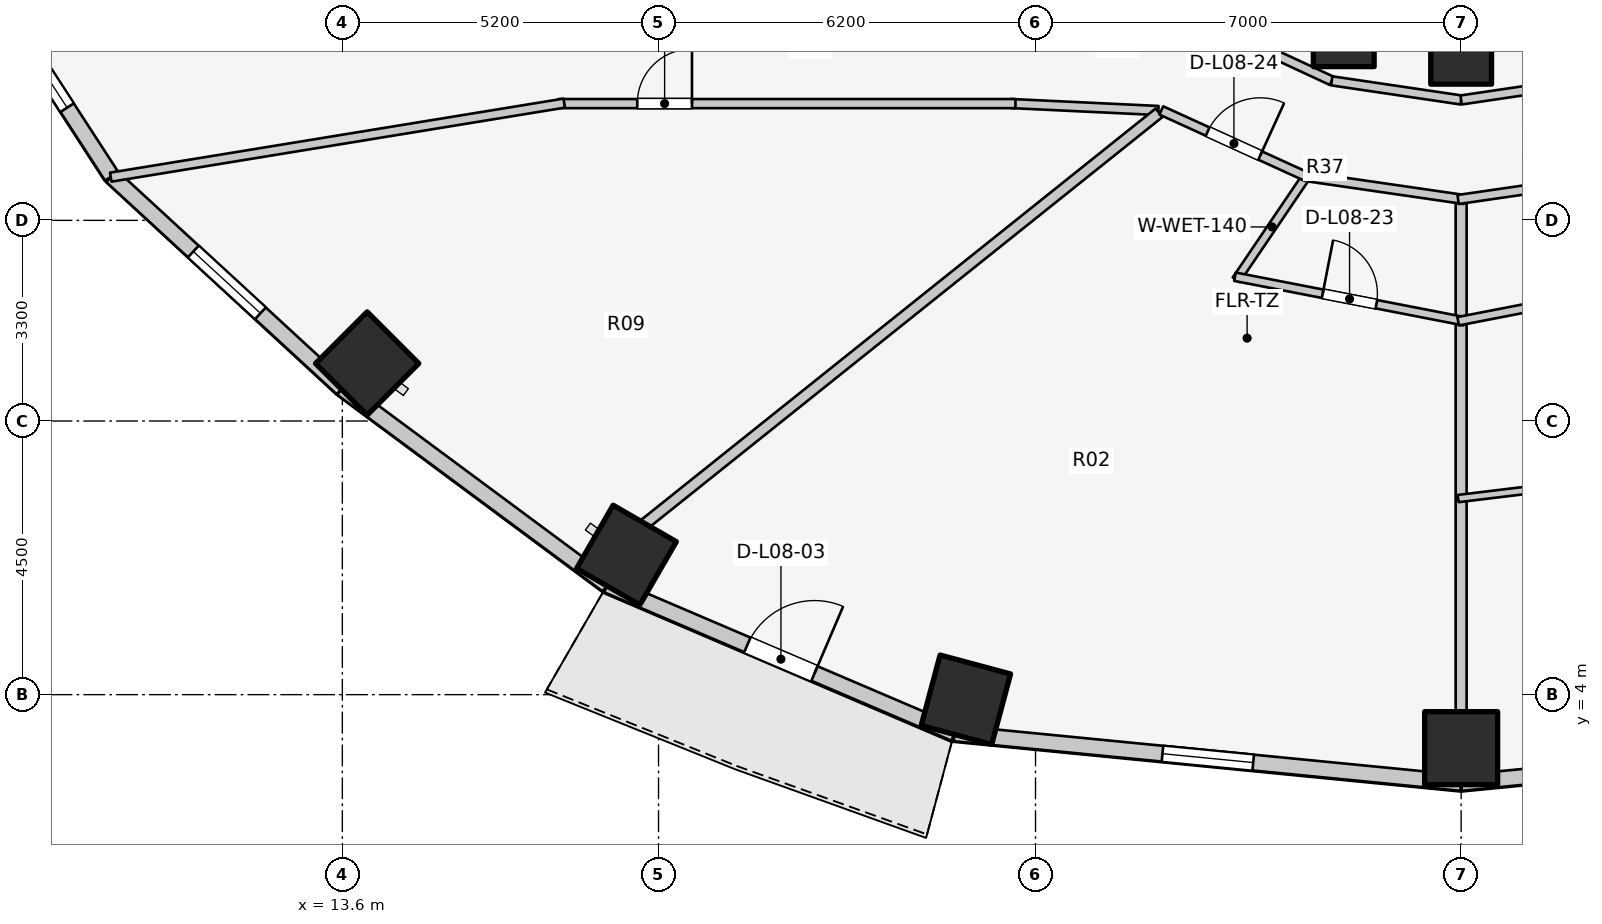
"""IFC4 building model, lengths in metres.
Left out: names, types, materials, properties, quantities, classifications, styles, units other than length and angle.
Written with IfcOpenShell. Run it as: python <this file> out.ifc"""

import sys

from ifc_helpers import new_model, si_unit, direction, frame, frame_2d, origin, origin_2d, place, context, subcontext, project, spatial, rectangle, extrude, element, fill, save


model = new_model("IFC4")
c1 = context("Model", 3, precision=1e-05, world=origin(), true_north=direction((0.0, 1.0)))
c2 = subcontext(c1, "Body", "Model", "MODEL_VIEW")
j1 = project(units=[si_unit("LENGTHUNIT", "METRE"), si_unit("PLANEANGLEUNIT", "RADIAN")], contexts=[c1])
p1 = place(None, origin())
s1 = spatial("IfcSite", under=j1, at=p1, CompositionType="ELEMENT")
p2 = place(p1, origin())
s2 = spatial("IfcBuilding", under=s1, at=p2, CompositionType="ELEMENT")
p3 = place(p2, frame((0.0, 0.0, 30.7)))
s3 = spatial("IfcBuildingStorey", under=s2, at=p3, CompositionType="ELEMENT", Elevation=30.7)
for number, where, z_axis, x_axis in (
    (1, (14.008, 9.446, 0.0), (0.0, 0.0, 1.0), (-0.707, -0.707, 0.0)),
    (2, (18.273, 6.296, 0.0), (0.0, 0.0, 1.0), (-0.5, -0.866, 0.0)),
):
    element("IfcColumn", number, at=place(p3, frame(where, z_axis=z_axis, x_axis=x_axis)), inside=s3, PredefinedType="COLUMN", context=c2, shape_type="SweptSolid", body=[
        extrude(rectangle(XDim=1.2, YDim=1.2, at=origin_2d()), origin(), (0.0, 0.0, 1.0), 3.1),
    ])
p4 = place(p3, frame((30.069, 14.828, 0.0), z_axis=(0.0, 0.0, 1.0), x_axis=(1.0, 0.0, 0.0)))
e3 = element("IfcColumn", 3, at=p4, inside=s3, PredefinedType="COLUMN", context=c2, shape_type="SweptSolid", body=[
    extrude(rectangle(XDim=1.0, YDim=1.0, at=origin_2d()), origin(), (0.0, 0.0, 1.0), 3.1),
])
p5 = place(p3, frame((23.855, 3.916, 0.0), z_axis=(0.0, 0.0, 1.0), x_axis=(-0.258819045103, -0.965925826289, 0.0)))
e4 = element("IfcColumn", 4, at=p5, inside=s3, PredefinedType="COLUMN", context=c2, shape_type="SweptSolid", body=[
    extrude(rectangle(XDim=1.2, YDim=1.2, at=origin_2d()), origin(), (0.0, 0.0, 1.0), 3.1),
])
p6 = place(p3, frame((32.0, 14.54, 0.0), z_axis=(0.0, 0.0, 1.0), x_axis=(1.0, 0.0, 0.0)))
e5 = element("IfcColumn", 5, at=p6, inside=s3, PredefinedType="COLUMN", context=c2, shape_type="SweptSolid", body=[
    extrude(rectangle(XDim=1.0, YDim=1.0, at=origin_2d()), origin(), (0.0, 0.0, 1.0), 3.1),
])
p7 = place(p3, frame((32.0, 3.12, 0.0), z_axis=(0.0, 0.0, 1.0), x_axis=(0.0, -1.0, 0.0)))
e6 = element("IfcColumn", 6, at=p7, inside=s3, PredefinedType="COLUMN", context=c2, shape_type="SweptSolid", body=[
    extrude(rectangle(XDim=1.2, YDim=1.2, at=origin_2d()), origin(), (0.0, 0.0, 1.0), 3.1),
])
p8 = place(p3, frame((7.033, 16.795, 0.0), z_axis=(0.0, 0.0, 1.0), x_axis=(0.544578722263, -0.838709732421, 0.0)))
e7 = element("IfcWall", 7, at=p8, inside=s3, PredefinedType="STANDARD", context=c2, shape_type="SweptSolid", body=[
    extrude(rectangle(XDim=5.092, YDim=0.26, at=frame_2d((2.546, 0.0))), origin(), (0.0, 0.0, 1.0), 2.85),
])
p9 = place(p8, frame((1.346, 0.0, 0.75)))
e8 = element("IfcOpeningElement", 8, at=p9, cuts=e7, PredefinedType="OPENING", context=c2, shape_type="SweptSolid", body=[
    extrude(rectangle(XDim=2.4, YDim=1.7, at=frame_2d((1.2, 0.85))), frame((0.0, 0.14, 0.0), z_axis=(0.0, -1.0, 0.0), x_axis=(1.0, 0.0, 0.0)), (0.0, 0.0, 1.0), 0.28),
])
p10 = place(p3, frame((9.806, 12.524, 0.0), z_axis=(0.0, 0.0, 1.0), x_axis=(0.735655109293, -0.67735630223, 0.0)))
e9 = element("IfcWall", 9, at=p10, inside=s3, PredefinedType="STANDARD", context=c2, shape_type="SweptSolid", body=[
    extrude(rectangle(XDim=5.151, YDim=0.26, at=frame_2d((2.575, 0.0))), origin(), (0.0, 0.0, 1.0), 2.85),
])
p11 = place(p10, frame((1.825, 0.0, 0.75)))
e10 = element("IfcOpeningElement", 10, at=p11, cuts=e9, PredefinedType="OPENING", context=c2, shape_type="SweptSolid", body=[
    extrude(rectangle(XDim=1.5, YDim=1.6, at=frame_2d((0.75, 0.8))), frame((0.0, 0.14, 0.0), z_axis=(0.0, -1.0, 0.0), x_axis=(1.0, 0.0, 0.0)), (0.0, 0.0, 1.0), 0.28),
])
p12 = place(p3, frame((13.595, 9.035, 0.0), z_axis=(0.0, 0.0, 1.0), x_axis=(0.803477531792, -0.595335078679, 0.0)))
e11 = element("IfcWall", 11, at=p12, inside=s3, PredefinedType="STANDARD", context=c2, shape_type="SweptSolid", body=[
    extrude(rectangle(XDim=5.43, YDim=0.26, at=frame_2d((2.715, 0.0))), origin(), (0.0, 0.0, 1.0), 2.85),
])
p13 = place(p3, frame((17.958, 5.803, 0.0), z_axis=(0.0, 0.0, 1.0), x_axis=(0.919612132394, -0.39282760335, 0.0)))
e12 = element("IfcWall", 12, at=p13, inside=s3, PredefinedType="STANDARD", context=c2, shape_type="SweptSolid", body=[
    extrude(rectangle(XDim=6.209, YDim=0.26, at=frame_2d((3.105, 0.0))), origin(), (0.0, 0.0, 1.0), 2.88),
])
p14 = place(p13, frame((2.505, 0.0, 0.0)))
e13 = element("IfcOpeningElement", 13, at=p14, cuts=e12, PredefinedType="OPENING", context=c2, shape_type="SweptSolid", body=[
    extrude(rectangle(XDim=1.2, YDim=2.2, at=frame_2d((0.6, 1.1))), frame((0.0, 0.14, 0.0), z_axis=(0.0, -1.0, 0.0), x_axis=(1.0, 0.0, 0.0)), (0.0, 0.0, 1.0), 0.28),
])
p15 = place(p3, frame((23.668, 3.364, 0.0), z_axis=(0.0, 0.0, 1.0), x_axis=(0.995247718352, -0.097375454379, 0.0)))
e14 = element("IfcWall", 14, at=p15, inside=s3, PredefinedType="STANDARD", context=c2, shape_type="SweptSolid", body=[
    extrude(rectangle(XDim=8.372, YDim=0.26, at=frame_2d((4.186, 0.0))), origin(), (0.0, 0.0, 1.0), 2.85),
])
p16 = place(p15, frame((3.436, 0.0, 0.75)))
e15 = element("IfcOpeningElement", 15, at=p16, cuts=e14, PredefinedType="OPENING", context=c2, shape_type="SweptSolid", body=[
    extrude(rectangle(XDim=1.5, YDim=1.6, at=frame_2d((0.75, 0.8))), frame((0.0, 0.14, 0.0), z_axis=(0.0, -1.0, 0.0), x_axis=(1.0, 0.0, 0.0)), (0.0, 0.0, 1.0), 0.28),
])
p17 = place(p3, frame((32.0, 2.549, 0.0), z_axis=(0.0, 0.0, 1.0), x_axis=(0.995247718352, 0.097375454379, 0.0)))
e16 = element("IfcWall", 16, at=p17, inside=s3, PredefinedType="STANDARD", context=c2, shape_type="SweptSolid", body=[
    extrude(rectangle(XDim=8.372, YDim=0.26, at=frame_2d((4.186, 0.0))), origin(), (0.0, 0.0, 1.0), 2.85),
])
p18 = place(p17, frame((3.436, 0.0, 0.75)))
e17 = element("IfcOpeningElement", 17, at=p18, cuts=e16, PredefinedType="OPENING", context=c2, shape_type="SweptSolid", body=[
    extrude(rectangle(XDim=1.5, YDim=1.6, at=frame_2d((0.75, 0.8))), frame((0.0, 0.14, 0.0), z_axis=(0.0, -1.0, 0.0), x_axis=(1.0, 0.0, 0.0)), (0.0, 0.0, 1.0), 0.28),
])
p19 = place(p3, frame((27.89, 15.015, 0.0), z_axis=(0.0, 0.0, 1.0), x_axis=(0.906943449489, -0.421252393975, 0.0)))
e18 = element("IfcWall", 18, at=p19, inside=s3, PredefinedType="PARTITIONING", context=c2, shape_type="SweptSolid", body=[
    extrude(rectangle(XDim=2.186, YDim=0.15, at=frame_2d((1.093, 0.0))), origin(), (0.0, 0.0, 1.0), 2.237),
])
for number, where, z_axis, x_axis in (
    (19, (29.873, 14.094, 0.0), (0.0, 0.0, 1.0), (0.989, -0.146, 0.0)),
    (20, (32.0, 13.78, 0.0), (0.0, 0.0, 1.0), (0.989, 0.146, 0.0)),
):
    element("IfcWall", number, at=place(p3, frame(where, z_axis=z_axis, x_axis=x_axis)), inside=s3, PredefinedType="PARTITIONING", context=c2, shape_type="SweptSolid", body=[
        extrude(rectangle(XDim=2.151, YDim=0.15, at=frame_2d((1.075, 0.0))), origin(), (0.0, 0.0, 1.0), 2.237),
    ])
p20 = place(p3, frame((27.02, 13.606, 0.0), z_axis=(0.0, 0.0, 1.0), x_axis=(-0.998877427952, 0.047369651964, 0.0)))
e21 = element("IfcWall", 21, at=p20, inside=s3, PredefinedType="PARTITIONING", context=c2, shape_type="SweptSolid", body=[
    extrude(rectangle(XDim=2.433, YDim=0.15, at=frame_2d((1.216, 0.0))), origin(), (0.0, 0.0, 1.0), 2.237),
])
p21 = place(p3, frame((17.15, 13.72, 0.0), z_axis=(0.0, 0.0, 1.0), x_axis=(1.0, 0.0, 0.0)))
e22 = element("IfcWall", 22, at=p21, inside=s3, PredefinedType="PARTITIONING", context=c2, shape_type="SweptSolid", body=[
    extrude(rectangle(XDim=7.52, YDim=0.15, at=frame_2d((3.76, 0.0))), origin(), (0.0, 0.0, 1.0), 2.237),
])
p22 = place(p21, frame((1.3, 0.0, 0.0)))
e23 = element("IfcOpeningElement", 23, at=p22, cuts=e22, PredefinedType="OPENING", context=c2, shape_type="SweptSolid", body=[
    extrude(rectangle(XDim=0.9, YDim=2.1, at=frame_2d((0.45, 1.05))), frame((0.0, 0.085, 0.0), z_axis=(0.0, -1.0, 0.0), x_axis=(1.0, 0.0, 0.0)), (0.0, 0.0, 1.0), 0.17),
])
p23 = place(p3, frame((17.249, 13.728, 0.0), z_axis=(0.0, 0.0, 1.0), x_axis=(-0.98693078372, -0.161144742846, 0.0)))
e24 = element("IfcWall", 24, at=p23, inside=s3, PredefinedType="PARTITIONING", context=c2, shape_type="SweptSolid", body=[
    extrude(rectangle(XDim=7.557, YDim=0.15, at=frame_2d((3.779, 0.0))), origin(), (0.0, 0.0, 1.0), 2.069),
])
p24 = place(p3, frame((27.032, 13.569, 0.0), z_axis=(0.0, 0.0, 1.0), x_axis=(-0.781055486744, -0.624461629428, 0.0)))
e25 = element("IfcWall", 25, at=p24, inside=s3, PredefinedType="PARTITIONING", context=c2, shape_type="SweptSolid", body=[
    extrude(rectangle(XDim=10.843, YDim=0.18, at=frame_2d((5.422, 0.0))), origin(), (0.0, 0.0, 1.0), 2.237),
])
p25 = place(p3, frame((32.0, 12.095, 0.0), z_axis=(0.0, 0.0, 1.0), x_axis=(0.0, -1.0, 0.0)))
e26 = element("IfcWall", 26, at=p25, inside=s3, PredefinedType="PARTITIONING", context=c2, shape_type="SweptSolid", body=[
    extrude(rectangle(XDim=8.395, YDim=0.18, at=frame_2d((4.198, 0.0))), origin(), (0.0, 0.0, 1.0), 2.237),
])
p26 = place(p3, frame((29.401, 12.527, 0.0), z_axis=(0.0, 0.0, 1.0), x_axis=(0.989649898776, -0.143502884474, 0.0)))
e27 = element("IfcWall", 27, at=p26, inside=s3, PredefinedType="PARTITIONING", context=c2, shape_type="SweptSolid", body=[
    extrude(rectangle(XDim=2.676, YDim=0.15, at=frame_2d((1.338, 0.0))), origin(), (0.0, 0.0, 1.0), 2.237),
])
p27 = place(p3, frame((29.479, 12.561, 0.0), z_axis=(0.0, 0.0, 1.0), x_axis=(-0.56056273171, -0.828111963335, 0.0)))
e28 = element("IfcWall", 28, at=p27, inside=s3, PredefinedType="PLUMBINGWALL", context=c2, shape_type="SweptSolid", body=[
    extrude(rectangle(XDim=2.1, YDim=0.14, at=frame_2d((1.05, 0.0))), origin(), (0.0, 0.0, 1.0), 2.855),
])
p28 = place(p3, frame((28.28, 10.873, 0.0), z_axis=(0.0, 0.0, 1.0), x_axis=(0.981623000654, -0.190830512727, 0.0)))
e29 = element("IfcWall", 29, at=p28, inside=s3, PredefinedType="PLUMBINGWALL", context=c2, shape_type="SweptSolid", body=[
    extrude(rectangle(XDim=3.839, YDim=0.14, at=frame_2d((1.92, 0.0))), origin(), (0.0, 0.0, 1.0), 2.237),
])
p29 = place(p28, frame((1.47, 0.0, 0.0)))
e30 = element("IfcOpeningElement", 30, at=p29, cuts=e29, PredefinedType="OPENING", context=c2, shape_type="SweptSolid", body=[
    extrude(rectangle(XDim=0.9, YDim=2.1, at=frame_2d((0.45, 1.05))), frame((0.0, 0.08, 0.0), z_axis=(0.0, -1.0, 0.0), x_axis=(1.0, 0.0, 0.0)), (0.0, 0.0, 1.0), 0.16),
])
p30 = place(p3, frame((27.069, 13.607, 0.0), z_axis=(0.0, 0.0, 1.0), x_axis=(0.909747571199, -0.415161843982, 0.0)))
e31 = element("IfcWall", 31, at=p30, inside=s3, PredefinedType="PARTITIONING", context=c2, shape_type="SweptSolid", body=[
    extrude(rectangle(XDim=2.625, YDim=0.15, at=frame_2d((1.312, 0.0))), origin(), (0.0, 0.0, 1.0), 2.237),
])
p31 = place(p30, frame((0.838, 0.0, 0.0)))
e32 = element("IfcOpeningElement", 32, at=p31, cuts=e31, PredefinedType="OPENING", context=c2, shape_type="SweptSolid", body=[
    extrude(rectangle(XDim=0.95, YDim=2.1, at=frame_2d((0.475, 1.05))), frame((0.0, 0.085, 0.0), z_axis=(0.0, -1.0, 0.0), x_axis=(1.0, 0.0, 0.0)), (0.0, 0.0, 1.0), 0.17),
])
p32 = place(p3, frame((31.95, 7.225, 0.0), z_axis=(0.0, 0.0, 1.0), x_axis=(0.992699076447, 0.120617343785, 0.0)))
e33 = element("IfcWall", 33, at=p32, inside=s3, PredefinedType="MOVABLE", context=c2, shape_type="SweptSolid", body=[
    extrude(rectangle(XDim=4.793, YDim=0.12, at=frame_2d((2.396, 0.0))), origin(), (0.0, 0.0, 1.0), 2.237),
])
p33 = place(p3, frame((31.95, 12.143, 0.0), z_axis=(0.0, 0.0, 1.0), x_axis=(0.989649898776, 0.143502884474, 0.0)))
e34 = element("IfcWall", 34, at=p33, inside=s3, PredefinedType="PARTITIONING", context=c2, shape_type="SweptSolid", body=[
    extrude(rectangle(XDim=2.676, YDim=0.15, at=frame_2d((1.338, 0.0))), origin(), (0.0, 0.0, 1.0), 2.237),
])
p34 = place(p3, frame((31.951, 10.14, 0.0), z_axis=(0.0, 0.0, 1.0), x_axis=(0.981623000654, 0.190830512727, 0.0)))
e35 = element("IfcWall", 35, at=p34, inside=s3, PredefinedType="PLUMBINGWALL", context=c2, shape_type="SweptSolid", body=[
    extrude(rectangle(XDim=3.839, YDim=0.14, at=frame_2d((1.92, 0.0))), origin(), (0.0, 0.0, 1.0), 2.237),
])
p35 = place(p34, frame((1.47, 0.0, 0.0)))
e36 = element("IfcOpeningElement", 36, at=p35, cuts=e35, PredefinedType="OPENING", context=c2, shape_type="SweptSolid", body=[
    extrude(rectangle(XDim=0.9, YDim=2.1, at=frame_2d((0.45, 1.05))), frame((0.0, 0.08, 0.0), z_axis=(0.0, -1.0, 0.0), x_axis=(1.0, 0.0, 0.0)), (0.0, 0.0, 1.0), 0.16),
])
p36 = place(p9, origin())
e37 = element("IfcWindow", 37, at=p36, inside=s3, PartitioningType="SINGLE_PANEL", PredefinedType="WINDOW", context=c2, shape_type="SweptSolid", body=[
    extrude(rectangle(XDim=2.4, YDim=1.7, at=frame_2d((1.2, 0.85))), frame((0.0, 0.03, 0.0), z_axis=(0.0, -1.0, 0.0), x_axis=(1.0, 0.0, 0.0)), (0.0, 0.0, 1.0), 0.06),
])
fill(e8, e37)
p37 = place(p11, origin())
e38 = element("IfcWindow", 38, at=p37, inside=s3, PartitioningType="SINGLE_PANEL", PredefinedType="WINDOW", context=c2, shape_type="SweptSolid", body=[
    extrude(rectangle(XDim=1.5, YDim=1.6, at=frame_2d((0.75, 0.8))), frame((0.0, 0.03, 0.0), z_axis=(0.0, -1.0, 0.0), x_axis=(1.0, 0.0, 0.0)), (0.0, 0.0, 1.0), 0.06),
])
fill(e10, e38)
p38 = place(p14, origin())
e39 = element("IfcDoor", 39, at=p38, inside=s3, OperationType="SINGLE_SWING_RIGHT", PredefinedType="DOOR", context=c2, shape_type="SweptSolid", body=[
    extrude(rectangle(XDim=1.2, YDim=2.2, at=frame_2d((0.6, 1.1))), frame((0.0, 0.025, 0.0), z_axis=(0.0, -1.0, 0.0), x_axis=(1.0, 0.0, 0.0)), (0.0, 0.0, 1.0), 0.05),
])
fill(e13, e39)
p39 = place(p16, origin())
e40 = element("IfcWindow", 40, at=p39, inside=s3, PartitioningType="SINGLE_PANEL", PredefinedType="WINDOW", context=c2, shape_type="SweptSolid", body=[
    extrude(rectangle(XDim=1.5, YDim=1.6, at=frame_2d((0.75, 0.8))), frame((0.0, 0.03, 0.0), z_axis=(0.0, -1.0, 0.0), x_axis=(1.0, 0.0, 0.0)), (0.0, 0.0, 1.0), 0.06),
])
fill(e15, e40)
p40 = place(p22, origin())
e41 = element("IfcDoor", 41, at=p40, inside=s3, OperationType="SINGLE_SWING_RIGHT", PredefinedType="DOOR", context=c2, shape_type="SweptSolid", body=[
    extrude(rectangle(XDim=0.9, YDim=2.1, at=frame_2d((0.45, 1.05))), frame((0.0, 0.025, 0.0), z_axis=(0.0, -1.0, 0.0), x_axis=(1.0, 0.0, 0.0)), (0.0, 0.0, 1.0), 0.05),
])
fill(e23, e41)
p41 = place(p29, origin())
e42 = element("IfcDoor", 42, at=p41, inside=s3, OperationType="SINGLE_SWING_LEFT", PredefinedType="DOOR", context=c2, shape_type="SweptSolid", body=[
    extrude(rectangle(XDim=0.9, YDim=2.1, at=frame_2d((0.45, 1.05))), frame((0.0, 0.025, 0.0), z_axis=(0.0, -1.0, 0.0), x_axis=(1.0, 0.0, 0.0)), (0.0, 0.0, 1.0), 0.05),
])
fill(e30, e42)
p42 = place(p31, origin())
e43 = element("IfcDoor", 43, at=p42, inside=s3, OperationType="SINGLE_SWING_RIGHT", PredefinedType="DOOR", context=c2, shape_type="SweptSolid", body=[
    extrude(rectangle(XDim=0.95, YDim=2.1, at=frame_2d((0.475, 1.05))), frame((0.0, 0.025, 0.0), z_axis=(0.0, -1.0, 0.0), x_axis=(1.0, 0.0, 0.0)), (0.0, 0.0, 1.0), 0.05),
])
fill(e32, e43)
save(model, sys.argv[1])
